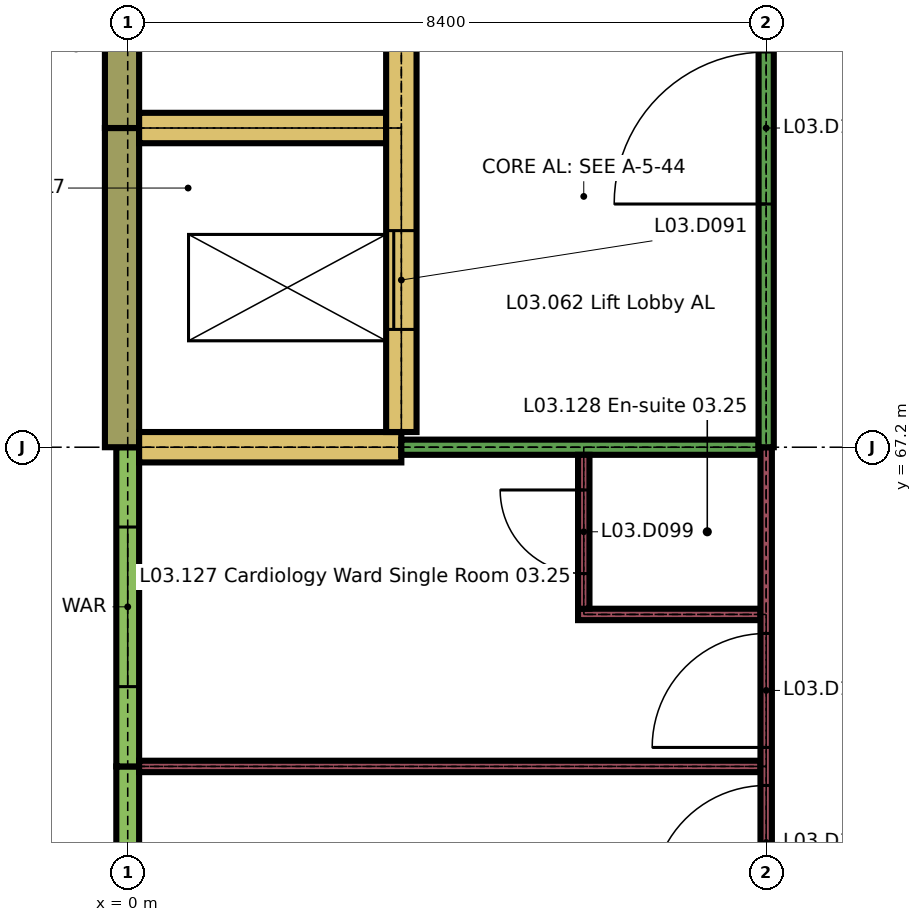
"""IFC4 building model, lengths in metres.
Left out: names, types, materials, properties, quantities, classifications, styles, units other than length and angle.
Written with IfcOpenShell. Run it as: python <this file> out.ifc"""

import sys

from ifc_helpers import new_model, si_unit, direction, frame, frame_2d, origin, place, context, subcontext, project, spatial, rectangle, extrude, element, fill, save


model = new_model("IFC4")
c1 = context("Model", 3, precision=1e-05, world=origin(), true_north=direction((0.0, 1.0)))
c2 = subcontext(c1, "Body", "Model", "MODEL_VIEW")
j1 = project(units=[si_unit("LENGTHUNIT", "METRE"), si_unit("PLANEANGLEUNIT", "RADIAN")], contexts=[c1])
p1 = place(None, origin())
s1 = spatial("IfcSite", under=j1, at=p1, CompositionType="ELEMENT")
p2 = place(p1, origin())
s2 = spatial("IfcBuilding", under=s1, at=p2, CompositionType="ELEMENT")
p3 = place(p2, frame((0.0, 0.0, 15.3)))
s3 = spatial("IfcBuildingStorey", under=s2, at=p3, CompositionType="ELEMENT", Elevation=15.3)
p4 = place(p3, frame((0.0, 59.15, 0.0), z_axis=(0.0, 0.0, 1.0), x_axis=(0.0, 1.0, 0.0)))
e1 = element("IfcWall", 1, at=p4, inside=s3, PredefinedType="SOLIDWALL", context=c2, shape_type="SweptSolid", body=[
    extrude(rectangle(XDim=3.85, YDim=0.3, at=frame_2d((1.925, 0.0))), origin(), (0.0, 0.0, 1.0), 2.96),
])
p5 = place(p4, frame((0.7, 0.0, 0.9)))
e2 = element("IfcOpeningElement", 2, at=p5, cuts=e1, PredefinedType="OPENING", context=c2, shape_type="SweptSolid", body=[
    extrude(rectangle(XDim=2.1, YDim=1.5, at=frame_2d((1.05, 0.75))), frame((0.0, 0.16, 0.0), z_axis=(0.0, -1.0, 0.0), x_axis=(1.0, 0.0, 0.0)), (0.0, 0.0, 1.0), 0.32),
])
p6 = place(p3, frame((0.0, 63.0, 0.0), z_axis=(0.0, 0.0, 1.0), x_axis=(0.0, 1.0, 0.0)))
e3 = element("IfcWall", 3, at=p6, inside=s3, PredefinedType="SOLIDWALL", context=c2, shape_type="SweptSolid", body=[
    extrude(rectangle(XDim=4.2, YDim=0.3, at=frame_2d((2.1, 0.0))), origin(), (0.0, 0.0, 1.0), 2.96),
])
p7 = place(p6, frame((1.05, 0.0, 0.9)))
e4 = element("IfcOpeningElement", 4, at=p7, cuts=e3, PredefinedType="OPENING", context=c2, shape_type="SweptSolid", body=[
    extrude(rectangle(XDim=2.1, YDim=1.5, at=frame_2d((1.05, 0.75))), frame((0.0, 0.16, 0.0), z_axis=(0.0, -1.0, 0.0), x_axis=(1.0, 0.0, 0.0)), (0.0, 0.0, 1.0), 0.32),
])
p8 = place(p3, frame((-0.075, 67.2, 0.0), z_axis=(0.0, 0.0, 1.0), x_axis=(0.0, 1.0, 0.0)))
e5 = element("IfcWall", 5, at=p8, inside=s3, PredefinedType="SOLIDWALL", context=c2, shape_type="SweptSolid", body=[
    extrude(rectangle(XDim=4.2, YDim=0.45, at=frame_2d((2.1, 0.0))), origin(), (0.0, 0.0, 1.0), 3.26),
])
p9 = place(p3, frame((-0.075, 71.4, 0.0), z_axis=(0.0, 0.0, 1.0), x_axis=(0.0, 1.0, 0.0)))
e6 = element("IfcWall", 6, at=p9, inside=s3, PredefinedType="SOLIDWALL", context=c2, shape_type="SweptSolid", body=[
    extrude(rectangle(XDim=4.2, YDim=0.45, at=frame_2d((2.1, 0.0))), origin(), (0.0, 0.0, 1.0), 3.26),
])
p10 = place(p3, frame((0.15, 63.0, 0.0), z_axis=(0.0, 0.0, 1.0), x_axis=(1.0, 0.0, 0.0)))
e7 = element("IfcWall", 7, at=p10, inside=s3, PredefinedType="PARTITIONING", context=c2, shape_type="SweptSolid", body=[
    extrude(rectangle(XDim=8.175, YDim=0.15, at=frame_2d((4.087, 0.0))), origin(), (0.0, 0.0, 1.0), 3.26),
])
p11 = place(p3, frame((5.925, 65.0, 0.0), z_axis=(0.0, 0.0, 1.0), x_axis=(1.0, 0.0, 0.0)))
e8 = element("IfcWall", 8, at=p11, inside=s3, PredefinedType="PARTITIONING", context=c2, shape_type="SweptSolid", body=[
    extrude(rectangle(XDim=2.4, YDim=0.15, at=frame_2d((1.2, 0.0))), origin(), (0.0, 0.0, 1.0), 3.26),
])
p12 = place(p3, frame((0.15, 67.2, 0.0), z_axis=(0.0, 0.0, 1.0), x_axis=(1.0, 0.0, 0.0)))
e9 = element("IfcWall", 9, at=p12, inside=s3, PredefinedType="SHEAR", context=c2, shape_type="SweptSolid", body=[
    extrude(rectangle(XDim=3.45, YDim=0.4, at=frame_2d((1.725, 0.0))), origin(), (0.0, 0.0, 1.0), 3.26),
])
p13 = place(p3, frame((3.6, 67.2, 0.0), z_axis=(0.0, 0.0, 1.0), x_axis=(1.0, 0.0, 0.0)))
e10 = element("IfcWall", 10, at=p13, inside=s3, PredefinedType="PARTITIONING", context=c2, shape_type="SweptSolid", body=[
    extrude(rectangle(XDim=4.7, YDim=0.2, at=frame_2d((2.35, 0.0))), origin(), (0.0, 0.0, 1.0), 3.26),
])
p14 = place(p3, frame((0.15, 71.4, 0.0), z_axis=(0.0, 0.0, 1.0), x_axis=(1.0, 0.0, 0.0)))
e11 = element("IfcWall", 11, at=p14, inside=s3, PredefinedType="SHEAR", context=c2, shape_type="SweptSolid", body=[
    extrude(rectangle(XDim=3.25, YDim=0.4, at=frame_2d((1.625, 0.0))), origin(), (0.0, 0.0, 1.0), 3.26),
])
p15 = place(p3, frame((3.6, 67.4, 0.0), z_axis=(0.0, 0.0, 1.0), x_axis=(0.0, 1.0, 0.0)))
e12 = element("IfcWall", 12, at=p15, inside=s3, PredefinedType="SHEAR", context=c2, shape_type="SweptSolid", body=[
    extrude(rectangle(XDim=8.0, YDim=0.4, at=frame_2d((4.0, 0.0))), origin(), (0.0, 0.0, 1.0), 3.26),
])
p16 = place(p15, frame((1.35, 0.0, 0.0)))
e13 = element("IfcOpeningElement", 13, at=p16, cuts=e12, PredefinedType="OPENING", context=c2, shape_type="SweptSolid", body=[
    extrude(rectangle(XDim=1.3, YDim=2.1, at=frame_2d((0.65, 1.05))), frame((0.0, 0.21, 0.0), z_axis=(0.0, -1.0, 0.0), x_axis=(1.0, 0.0, 0.0)), (0.0, 0.0, 1.0), 0.42),
])
p17 = place(p15, frame((5.45, 0.0, 0.0)))
e14 = element("IfcOpeningElement", 14, at=p17, cuts=e12, PredefinedType="OPENING", context=c2, shape_type="SweptSolid", body=[
    extrude(rectangle(XDim=1.1, YDim=2.1, at=frame_2d((0.55, 1.05))), frame((0.0, 0.21, 0.0), z_axis=(0.0, -1.0, 0.0), x_axis=(1.0, 0.0, 0.0)), (0.0, 0.0, 1.0), 0.42),
])
p18 = place(p3, frame((6.0, 65.075, 0.0), z_axis=(0.0, 0.0, 1.0), x_axis=(0.0, 1.0, 0.0)))
e15 = element("IfcWall", 15, at=p18, inside=s3, PredefinedType="PARTITIONING", context=c2, shape_type="SweptSolid", body=[
    extrude(rectangle(XDim=2.025, YDim=0.15, at=frame_2d((1.013, 0.0))), origin(), (0.0, 0.0, 1.0), 3.26),
])
p19 = place(p18, frame((0.462, 0.0, 0.0)))
e16 = element("IfcOpeningElement", 16, at=p19, cuts=e15, PredefinedType="OPENING", context=c2, shape_type="SweptSolid", body=[
    extrude(rectangle(XDim=1.1, YDim=2.1, at=frame_2d((0.55, 1.05))), frame((0.0, 0.085, 0.0), z_axis=(0.0, -1.0, 0.0), x_axis=(1.0, 0.0, 0.0)), (0.0, 0.0, 1.0), 0.17),
])
p20 = place(p3, frame((8.4, 59.15, 0.0), z_axis=(0.0, 0.0, 1.0), x_axis=(0.0, 1.0, 0.0)))
e17 = element("IfcWall", 17, at=p20, inside=s3, PredefinedType="PARTITIONING", context=c2, shape_type="SweptSolid", body=[
    extrude(rectangle(XDim=8.05, YDim=0.15, at=frame_2d((4.025, 0.0))), origin(), (0.0, 0.0, 1.0), 3.26),
])
p21 = place(p20, frame((2.1, 0.0, 0.0)))
e18 = element("IfcOpeningElement", 18, at=p21, cuts=e17, PredefinedType="OPENING", context=c2, shape_type="SweptSolid", body=[
    extrude(rectangle(XDim=1.5, YDim=2.4, at=frame_2d((0.75, 1.2))), frame((0.0, 0.085, 0.0), z_axis=(0.0, -1.0, 0.0), x_axis=(1.0, 0.0, 0.0)), (0.0, 0.0, 1.0), 0.17),
])
p22 = place(p20, frame((4.1, 0.0, 0.0)))
e19 = element("IfcOpeningElement", 19, at=p22, cuts=e17, PredefinedType="OPENING", context=c2, shape_type="SweptSolid", body=[
    extrude(rectangle(XDim=1.5, YDim=2.4, at=frame_2d((0.75, 1.2))), frame((0.0, 0.085, 0.0), z_axis=(0.0, -1.0, 0.0), x_axis=(1.0, 0.0, 0.0)), (0.0, 0.0, 1.0), 0.17),
])
p23 = place(p3, frame((8.4, 67.2, 0.0), z_axis=(0.0, 0.0, 1.0), x_axis=(0.0, 1.0, 0.0)))
e20 = element("IfcWall", 20, at=p23, inside=s3, PredefinedType="PARTITIONING", context=c2, shape_type="SweptSolid", body=[
    extrude(rectangle(XDim=8.4, YDim=0.2, at=frame_2d((4.2, 0.0))), origin(), (0.0, 0.0, 1.0), 3.26),
])
p24 = place(p23, frame((3.2, 0.0, 0.0)))
e21 = element("IfcOpeningElement", 21, at=p24, cuts=e20, PredefinedType="OPENING", context=c2, shape_type="SweptSolid", body=[
    extrude(rectangle(XDim=2.0, YDim=2.4, at=frame_2d((1.0, 1.2))), frame((0.0, 0.11, 0.0), z_axis=(0.0, -1.0, 0.0), x_axis=(1.0, 0.0, 0.0)), (0.0, 0.0, 1.0), 0.22),
])
p25 = place(p7, origin())
e22 = element("IfcWindow", 22, at=p25, inside=s3, PartitioningType="DOUBLE_PANEL_VERTICAL", PredefinedType="WINDOW", context=c2, shape_type="SweptSolid", body=[
    extrude(rectangle(XDim=2.1, YDim=1.5, at=frame_2d((1.05, 0.75))), frame((0.0, 0.05, 0.0), z_axis=(0.0, -1.0, 0.0), x_axis=(1.0, 0.0, 0.0)), (0.0, 0.0, 1.0), 0.1),
])
fill(e4, e22)
p26 = place(p16, origin())
e23 = element("IfcDoor", 23, at=p26, inside=s3, OperationType="SLIDING_TO_LEFT", PredefinedType="DOOR", context=c2, shape_type="SweptSolid", body=[
    extrude(rectangle(XDim=1.3, YDim=2.1, at=frame_2d((0.65, 1.05))), frame((0.0, 0.025, 0.0), z_axis=(0.0, -1.0, 0.0), x_axis=(1.0, 0.0, 0.0)), (0.0, 0.0, 1.0), 0.05),
])
fill(e13, e23)
p27 = place(p19, origin())
e24 = element("IfcDoor", 24, at=p27, inside=s3, OperationType="SINGLE_SWING_LEFT", PredefinedType="DOOR", context=c2, shape_type="SweptSolid", body=[
    extrude(rectangle(XDim=1.1, YDim=2.1, at=frame_2d((0.55, 1.05))), frame((0.0, 0.025, 0.0), z_axis=(0.0, -1.0, 0.0), x_axis=(1.0, 0.0, 0.0)), (0.0, 0.0, 1.0), 0.05),
])
fill(e16, e24)
p28 = place(p21, origin())
e25 = element("IfcDoor", 25, at=p28, inside=s3, OperationType="SINGLE_SWING_RIGHT", PredefinedType="DOOR", context=c2, shape_type="SweptSolid", body=[
    extrude(rectangle(XDim=1.5, YDim=2.4, at=frame_2d((0.75, 1.2))), frame((0.0, 0.03, 0.0), z_axis=(0.0, -1.0, 0.0), x_axis=(1.0, 0.0, 0.0)), (0.0, 0.0, 1.0), 0.06),
])
fill(e18, e25)
p29 = place(p22, origin())
e26 = element("IfcDoor", 26, at=p29, inside=s3, OperationType="SINGLE_SWING_RIGHT", PredefinedType="DOOR", context=c2, shape_type="SweptSolid", body=[
    extrude(rectangle(XDim=1.5, YDim=2.4, at=frame_2d((0.75, 1.2))), frame((0.0, 0.03, 0.0), z_axis=(0.0, -1.0, 0.0), x_axis=(1.0, 0.0, 0.0)), (0.0, 0.0, 1.0), 0.06),
])
fill(e19, e26)
p30 = place(p24, origin())
e27 = element("IfcDoor", 27, at=p30, inside=s3, OperationType="SINGLE_SWING_RIGHT", PredefinedType="DOOR", context=c2, shape_type="SweptSolid", body=[
    extrude(rectangle(XDim=2.0, YDim=2.4, at=frame_2d((1.0, 1.2))), frame((0.0, 0.03, 0.0), z_axis=(0.0, -1.0, 0.0), x_axis=(1.0, 0.0, 0.0)), (0.0, 0.0, 1.0), 0.06),
])
fill(e21, e27)
save(model, sys.argv[1])
